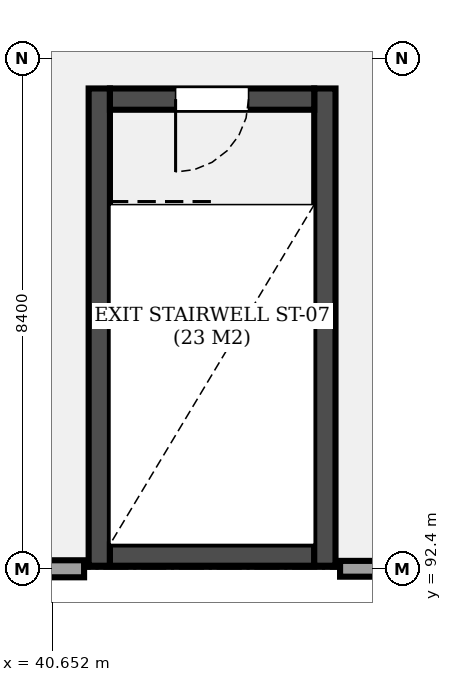
"""IFC4 building model, lengths in metres.
Left out: names, types, materials, properties, quantities, classifications, styles, units other than length and angle.
Written with IfcOpenShell. Run it as: python <this file> out.ifc"""

import sys

from ifc_helpers import new_model, si_unit, direction, frame, frame_2d, origin, place, context, subcontext, project, spatial, rectangle, extrude, element, fill, save


model = new_model("IFC4")
c1 = context("Model", 3, precision=1e-05, world=origin(), true_north=direction((0.0, 1.0)))
c2 = subcontext(c1, "Body", "Model", "MODEL_VIEW")
j1 = project(units=[si_unit("LENGTHUNIT", "METRE"), si_unit("PLANEANGLEUNIT", "RADIAN")], contexts=[c1])
p1 = place(None, origin())
s1 = spatial("IfcSite", under=j1, at=p1, CompositionType="ELEMENT")
p2 = place(p1, origin())
s2 = spatial("IfcBuilding", under=s1, at=p2, CompositionType="ELEMENT")
p3 = place(p2, frame((0.0, 0.0, 13.5)))
s3 = spatial("IfcBuildingStorey", under=s2, at=p3, CompositionType="ELEMENT", Elevation=13.5)
p4 = place(p3, frame((41.425, 100.3, 0.0), z_axis=(0.0, 0.0, 1.0), x_axis=(0.0, -1.0, 0.0)))
e1 = element("IfcWall", 1, at=p4, inside=s3, PredefinedType="SHEAR", context=c2, shape_type="SweptSolid", body=[
    extrude(rectangle(XDim=7.85, YDim=0.35, at=frame_2d((3.925, 0.0))), origin(), (0.0, 0.0, 1.0), 4.3),
])
p5 = place(p3, frame((41.6, 92.625, 0.0), z_axis=(0.0, 0.0, 1.0), x_axis=(1.0, 0.0, 0.0)))
e2 = element("IfcWall", 2, at=p5, inside=s3, PredefinedType="SHEAR", context=c2, shape_type="SweptSolid", body=[
    extrude(rectangle(XDim=3.36, YDim=0.35, at=frame_2d((1.68, 0.0))), origin(), (0.0, 0.0, 1.0), 4.3),
])
p6 = place(p3, frame((45.135, 92.45, 0.0), z_axis=(0.0, 0.0, 1.0), x_axis=(0.0, 1.0, 0.0)))
e3 = element("IfcWall", 3, at=p6, inside=s3, PredefinedType="SHEAR", context=c2, shape_type="SweptSolid", body=[
    extrude(rectangle(XDim=7.85, YDim=0.35, at=frame_2d((3.925, 0.0))), origin(), (0.0, 0.0, 1.0), 4.3),
])
p7 = place(p3, frame((44.96, 100.125, 0.0), z_axis=(0.0, 0.0, 1.0), x_axis=(-1.0, 0.0, 0.0)))
e4 = element("IfcWall", 4, at=p7, inside=s3, PredefinedType="SHEAR", context=c2, shape_type="SweptSolid", body=[
    extrude(rectangle(XDim=3.36, YDim=0.35, at=frame_2d((1.68, 0.0))), origin(), (0.0, 0.0, 1.0), 4.3),
])
p8 = place(p7, frame((1.08, 0.0, 0.0)))
e5 = element("IfcOpeningElement", 5, at=p8, cuts=e4, PredefinedType="OPENING", context=c2, shape_type="SweptSolid", body=[
    extrude(rectangle(XDim=1.2, YDim=2.2, at=frame_2d((0.6, 1.1))), frame((0.0, 0.185, 0.0), z_axis=(0.0, -1.0, 0.0), x_axis=(1.0, 0.0, 0.0)), (0.0, 0.0, 1.0), 0.37),
])
p9 = place(p3, frame((48.0, 92.4, 0.0), z_axis=(0.0, 0.0, 1.0), x_axis=(-1.0, 0.0, 0.0)))
e6 = element("IfcWall", 6, at=p9, inside=s3, PredefinedType="SOLIDWALL", context=c2, shape_type="SweptSolid", body=[
    extrude(rectangle(XDim=2.615, YDim=0.26, at=frame_2d((1.308, 0.0))), origin(), (0.0, 0.0, 1.0), 3.49),
])
p10 = place(p3, frame((41.175, 92.4, 0.0), z_axis=(0.0, 0.0, 1.0), x_axis=(-1.0, 0.0, 0.0)))
e7 = element("IfcWall", 7, at=p10, inside=s3, PredefinedType="SOLIDWALL", context=c2, shape_type="SweptSolid", body=[
    extrude(rectangle(XDim=2.775, YDim=0.28, at=frame_2d((1.388, 0.0))), origin(), (0.0, 0.0, 1.0), 3.49),
])
p11 = place(p8, origin())
e8 = element("IfcDoor", 8, at=p11, inside=s3, OperationType="SINGLE_SWING_RIGHT", PredefinedType="DOOR", context=c2, shape_type="SweptSolid", body=[
    extrude(rectangle(XDim=1.2, YDim=2.2, at=frame_2d((0.6, 1.1))), frame((0.0, 0.025, 0.0), z_axis=(0.0, -1.0, 0.0), x_axis=(1.0, 0.0, 0.0)), (0.0, 0.0, 1.0), 0.05),
])
fill(e5, e8)
save(model, sys.argv[1])
